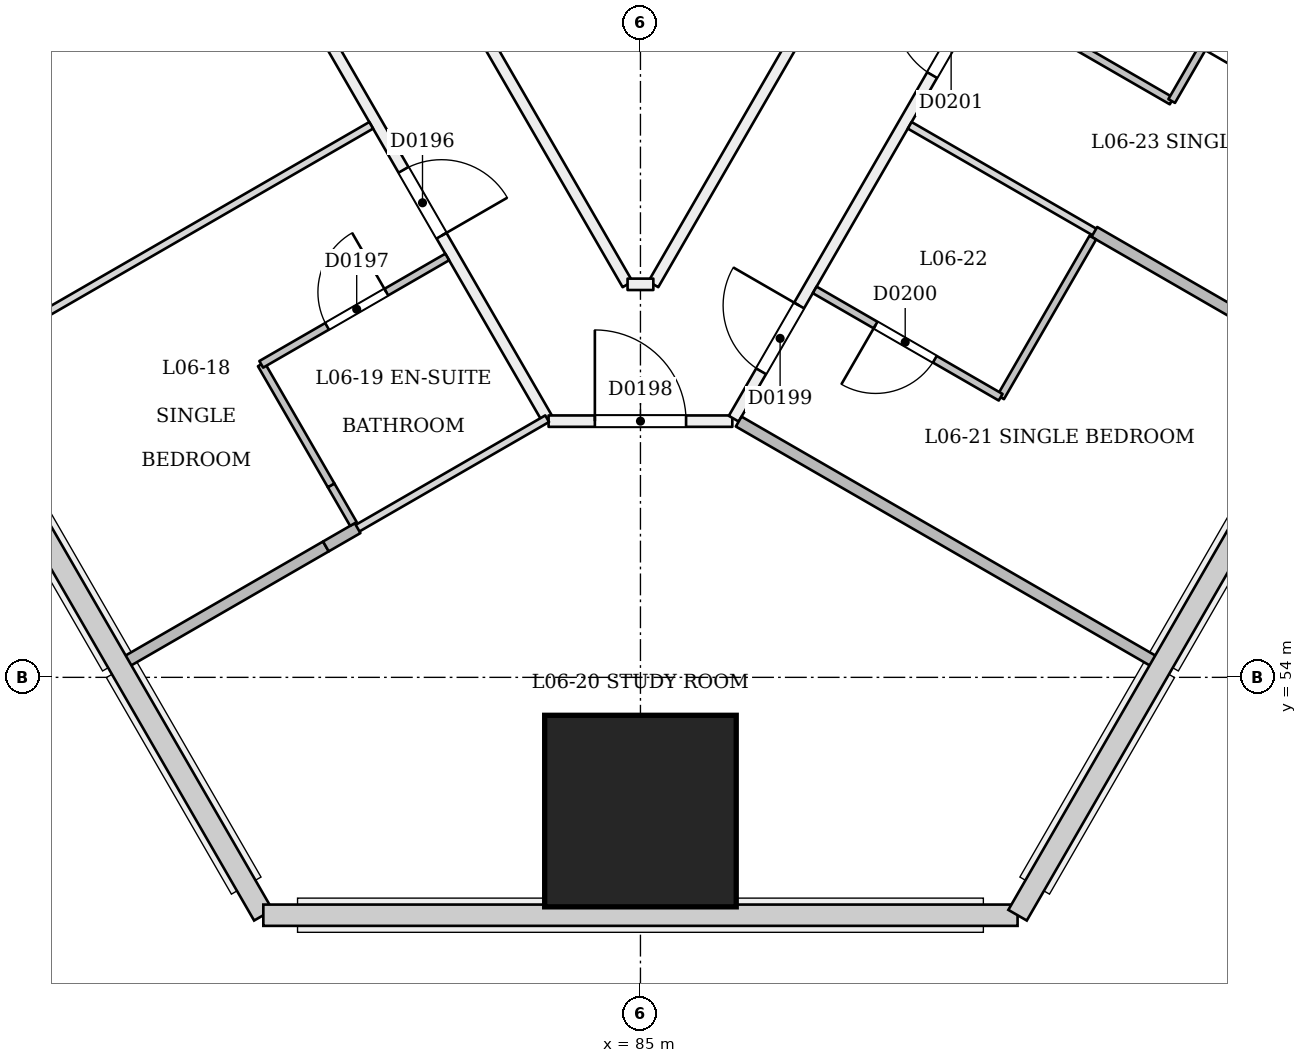
"""IFC4 building model, lengths in metres.
Left out: names, types, materials, properties, quantities, classifications, styles, units other than length and angle.
Written with IfcOpenShell. Run it as: python <this file> out.ifc"""

import sys

from ifc_helpers import new_model, si_unit, direction, frame, frame_2d, origin, origin_2d, place, context, subcontext, project, spatial, rectangle, extrude, element, fill, save


model = new_model("IFC4")
c1 = context("Model", 3, precision=1e-05, world=origin(), true_north=direction((0.0, 1.0)))
c2 = subcontext(c1, "Body", "Model", "MODEL_VIEW")
j1 = project(units=[si_unit("LENGTHUNIT", "METRE"), si_unit("PLANEANGLEUNIT", "RADIAN")], contexts=[c1])
p1 = place(None, origin())
s1 = spatial("IfcSite", under=j1, at=p1, CompositionType="ELEMENT")
p2 = place(p1, origin())
s2 = spatial("IfcBuilding", under=s1, at=p2, CompositionType="ELEMENT")
p3 = place(p2, frame((0.0, 0.0, 30.6)))
s3 = spatial("IfcBuildingStorey", under=s2, at=p3, CompositionType="ELEMENT", Elevation=30.6)
p4 = place(p3, frame((85.0, 52.171, 0.0), z_axis=(0.0, 0.058360852261, 0.998295552892), x_axis=(-1.0, 0.0, 0.0)))
e1 = element("IfcColumn", 1, at=p4, inside=s3, PredefinedType="COLUMN", context=c2, shape_type="SweptSolid", body=[
    extrude(rectangle(XDim=2.52, YDim=2.52, at=origin_2d()), origin(), (0.0, 0.0, 1.0), 3.606),
])
p5 = place(p3, frame((61.273, 96.374, 0.0), z_axis=(0.0, 0.0, 1.0), x_axis=(0.5000018851, -0.866024315419, 0.0)))
e2 = element("IfcWall", 2, at=p5, inside=s3, PredefinedType="PARTITIONING", context=c2, shape_type="SweptSolid", body=[
    extrude(rectangle(XDim=45.0, YDim=0.15, at=frame_2d((22.5, 0.0))), origin(), (0.0, 0.0, 1.0), 2.7),
])
p6 = place(p5, frame((2.829, 0.0, 0.0)))
e3 = element("IfcOpeningElement", 3, at=p6, cuts=e2, PredefinedType="OPENING", context=c2, shape_type="SweptSolid", body=[
    extrude(rectangle(XDim=1.1, YDim=2.1, at=frame_2d((0.55, 1.05))), frame((0.0, 0.085, 0.0), z_axis=(0.0, -1.0, 0.0), x_axis=(1.0, 0.0, 0.0)), (0.0, 0.0, 1.0), 0.171),
])
p7 = place(p5, frame((7.3, 0.0, 0.0)))
e4 = element("IfcOpeningElement", 4, at=p7, cuts=e2, PredefinedType="OPENING", context=c2, shape_type="SweptSolid", body=[
    extrude(rectangle(XDim=1.2, YDim=2.1, at=frame_2d((0.6, 1.05))), frame((0.0, 0.085, 0.0), z_axis=(0.0, -1.0, 0.0), x_axis=(1.0, 0.0, 0.0)), (0.0, 0.0, 1.0), 0.171),
])
p8 = place(p5, frame((14.22, 0.0, 0.0)))
e5 = element("IfcOpeningElement", 5, at=p8, cuts=e2, PredefinedType="OPENING", context=c2, shape_type="SweptSolid", body=[
    extrude(rectangle(XDim=1.0, YDim=2.1, at=frame_2d((0.5, 1.05))), frame((0.0, 0.085, 0.0), z_axis=(0.0, -1.0, 0.0), x_axis=(1.0, 0.0, 0.0)), (0.0, 0.0, 1.0), 0.171),
])
p9 = place(p5, frame((20.895, 0.0, 0.0)))
e6 = element("IfcOpeningElement", 6, at=p9, cuts=e2, PredefinedType="OPENING", context=c2, shape_type="SweptSolid", body=[
    extrude(rectangle(XDim=1.0, YDim=2.1, at=frame_2d((0.5, 1.05))), frame((0.0, 0.085, 0.0), z_axis=(0.0, -1.0, 0.0), x_axis=(1.0, 0.0, 0.0)), (0.0, 0.0, 1.0), 0.171),
])
p10 = place(p5, frame((24.25, 0.0, 0.0)))
e7 = element("IfcOpeningElement", 7, at=p10, cuts=e2, PredefinedType="OPENING", context=c2, shape_type="SweptSolid", body=[
    extrude(rectangle(XDim=1.0, YDim=2.1, at=frame_2d((0.5, 1.05))), frame((0.0, 0.085, 0.0), z_axis=(0.0, -1.0, 0.0), x_axis=(1.0, 0.0, 0.0)), (0.0, 0.0, 1.0), 0.171),
])
p11 = place(p5, frame((29.78, 0.0, 0.0)))
e8 = element("IfcOpeningElement", 8, at=p11, cuts=e2, PredefinedType="OPENING", context=c2, shape_type="SweptSolid", body=[
    extrude(rectangle(XDim=1.0, YDim=2.1, at=frame_2d((0.5, 1.05))), frame((0.0, 0.085, 0.0), z_axis=(0.0, -1.0, 0.0), x_axis=(1.0, 0.0, 0.0)), (0.0, 0.0, 1.0), 0.171),
])
p12 = place(p5, frame((34.3, 0.0, 0.0)))
e9 = element("IfcOpeningElement", 9, at=p12, cuts=e2, PredefinedType="OPENING", context=c2, shape_type="SweptSolid", body=[
    extrude(rectangle(XDim=1.2, YDim=2.1, at=frame_2d((0.6, 1.05))), frame((0.0, 0.085, 0.0), z_axis=(0.0, -1.0, 0.0), x_axis=(1.0, 0.0, 0.0)), (0.0, 0.0, 1.0), 0.171),
])
p13 = place(p5, frame((41.22, 0.0, 0.0)))
e10 = element("IfcOpeningElement", 10, at=p13, cuts=e2, PredefinedType="OPENING", context=c2, shape_type="SweptSolid", body=[
    extrude(rectangle(XDim=1.0, YDim=2.1, at=frame_2d((0.5, 1.05))), frame((0.0, 0.085, 0.0), z_axis=(0.0, -1.0, 0.0), x_axis=(1.0, 0.0, 0.0)), (0.0, 0.0, 1.0), 0.171),
])
p14 = place(p3, frame((83.791, 57.371, 0.0), z_axis=(0.0, 0.0, 1.0), x_axis=(1.0, 0.0, 0.0)))
e11 = element("IfcWall", 11, at=p14, inside=s3, PredefinedType="PARTITIONING", context=c2, shape_type="SweptSolid", body=[
    extrude(rectangle(XDim=2.417, YDim=0.15, at=frame_2d((1.209, 0.0))), origin(), (0.0, 0.0, 1.0), 3.1),
])
p15 = place(p14, frame((0.609, 0.0, 0.0)))
e12 = element("IfcOpeningElement", 12, at=p15, cuts=e11, PredefinedType="OPENING", context=c2, shape_type="SweptSolid", body=[
    extrude(rectangle(XDim=1.2, YDim=2.1, at=frame_2d((0.6, 1.05))), frame((0.0, 0.085, 0.0), z_axis=(0.0, -1.0, 0.0), x_axis=(1.0, 0.0, 0.0)), (0.0, 0.0, 1.0), 0.171),
])
p16 = place(p3, frame((86.227, 57.403, 0.0), z_axis=(0.0, 0.0, 1.0), x_axis=(0.5000018851, 0.866024315419, 0.0)))
e13 = element("IfcWall", 13, at=p16, inside=s3, PredefinedType="PARTITIONING", context=c2, shape_type="SweptSolid", body=[
    extrude(rectangle(XDim=45.0, YDim=0.15, at=frame_2d((22.5, 0.0))), origin(), (0.0, 0.0, 1.0), 2.7),
])
p17 = place(p16, frame((0.72, 0.0, 0.0)))
e14 = element("IfcOpeningElement", 14, at=p17, cuts=e13, PredefinedType="OPENING", context=c2, shape_type="SweptSolid", body=[
    extrude(rectangle(XDim=1.0, YDim=2.1, at=frame_2d((0.5, 1.05))), frame((0.0, 0.085, 0.0), z_axis=(0.0, -1.0, 0.0), x_axis=(1.0, 0.0, 0.0)), (0.0, 0.0, 1.0), 0.171),
])
p18 = place(p16, frame((5.22, 0.0, 0.0)))
e15 = element("IfcOpeningElement", 15, at=p18, cuts=e13, PredefinedType="OPENING", context=c2, shape_type="SweptSolid", body=[
    extrude(rectangle(XDim=1.0, YDim=2.1, at=frame_2d((0.5, 1.05))), frame((0.0, 0.085, 0.0), z_axis=(0.0, -1.0, 0.0), x_axis=(1.0, 0.0, 0.0)), (0.0, 0.0, 1.0), 0.171),
])
p19 = place(p16, frame((11.78, 0.0, 0.0)))
e16 = element("IfcOpeningElement", 16, at=p19, cuts=e13, PredefinedType="OPENING", context=c2, shape_type="SweptSolid", body=[
    extrude(rectangle(XDim=1.0, YDim=2.1, at=frame_2d((0.5, 1.05))), frame((0.0, 0.085, 0.0), z_axis=(0.0, -1.0, 0.0), x_axis=(1.0, 0.0, 0.0)), (0.0, 0.0, 1.0), 0.171),
])
p20 = place(p16, frame((14.22, 0.0, 0.0)))
e17 = element("IfcOpeningElement", 17, at=p20, cuts=e13, PredefinedType="OPENING", context=c2, shape_type="SweptSolid", body=[
    extrude(rectangle(XDim=1.0, YDim=2.1, at=frame_2d((0.5, 1.05))), frame((0.0, 0.085, 0.0), z_axis=(0.0, -1.0, 0.0), x_axis=(1.0, 0.0, 0.0)), (0.0, 0.0, 1.0), 0.171),
])
p21 = place(p16, frame((19.75, 0.0, 0.0)))
e18 = element("IfcOpeningElement", 18, at=p21, cuts=e13, PredefinedType="OPENING", context=c2, shape_type="SweptSolid", body=[
    extrude(rectangle(XDim=1.0, YDim=2.1, at=frame_2d((0.5, 1.05))), frame((0.0, 0.085, 0.0), z_axis=(0.0, -1.0, 0.0), x_axis=(1.0, 0.0, 0.0)), (0.0, 0.0, 1.0), 0.171),
])
p22 = place(p16, frame((23.105, 0.0, 0.0)))
e19 = element("IfcOpeningElement", 19, at=p22, cuts=e13, PredefinedType="OPENING", context=c2, shape_type="SweptSolid", body=[
    extrude(rectangle(XDim=1.0, YDim=2.1, at=frame_2d((0.5, 1.05))), frame((0.0, 0.085, 0.0), z_axis=(0.0, -1.0, 0.0), x_axis=(1.0, 0.0, 0.0)), (0.0, 0.0, 1.0), 0.171),
])
p23 = place(p16, frame((28.75, 0.0, 0.0)))
e20 = element("IfcOpeningElement", 20, at=p23, cuts=e13, PredefinedType="OPENING", context=c2, shape_type="SweptSolid", body=[
    extrude(rectangle(XDim=1.0, YDim=2.1, at=frame_2d((0.5, 1.05))), frame((0.0, 0.085, 0.0), z_axis=(0.0, -1.0, 0.0), x_axis=(1.0, 0.0, 0.0)), (0.0, 0.0, 1.0), 0.171),
])
p24 = place(p16, frame((32.105, 0.0, 0.0)))
e21 = element("IfcOpeningElement", 21, at=p24, cuts=e13, PredefinedType="OPENING", context=c2, shape_type="SweptSolid", body=[
    extrude(rectangle(XDim=1.0, YDim=2.1, at=frame_2d((0.5, 1.05))), frame((0.0, 0.085, 0.0), z_axis=(0.0, -1.0, 0.0), x_axis=(1.0, 0.0, 0.0)), (0.0, 0.0, 1.0), 0.171),
])
p25 = place(p16, frame((36.504, 0.0, 0.0)))
e22 = element("IfcOpeningElement", 22, at=p25, cuts=e13, PredefinedType="OPENING", context=c2, shape_type="SweptSolid", body=[
    extrude(rectangle(XDim=1.0, YDim=2.1, at=frame_2d((0.5, 1.05))), frame((0.0, 0.085, 0.0), z_axis=(0.0, -1.0, 0.0), x_axis=(1.0, 0.0, 0.0)), (0.0, 0.0, 1.0), 0.171),
])
p26 = place(p16, frame((38.654, 0.0, 0.0)))
e23 = element("IfcOpeningElement", 23, at=p26, cuts=e13, PredefinedType="OPENING", context=c2, shape_type="SweptSolid", body=[
    extrude(rectangle(XDim=1.0, YDim=2.1, at=frame_2d((0.5, 1.05))), frame((0.0, 0.085, 0.0), z_axis=(0.0, -1.0, 0.0), x_axis=(1.0, 0.0, 0.0)), (0.0, 0.0, 1.0), 0.171),
])
p27 = place(p16, frame((41.071, 0.0, 0.0)))
e24 = element("IfcOpeningElement", 24, at=p27, cuts=e13, PredefinedType="OPENING", context=c2, shape_type="SweptSolid", body=[
    extrude(rectangle(XDim=1.1, YDim=2.1, at=frame_2d((0.55, 1.05))), frame((0.0, 0.085, 0.0), z_axis=(0.0, -1.0, 0.0), x_axis=(1.0, 0.0, 0.0)), (0.0, 0.0, 1.0), 0.171),
])
p28 = place(p3, frame((103.315, 90.6, 0.0), z_axis=(0.0, 0.0, 1.0), x_axis=(-0.499999056994, -0.866025948229, 0.0)))
e25 = element("IfcWall", 25, at=p28, inside=s3, PredefinedType="PARTITIONING", context=c2, shape_type="SweptSolid", body=[
    extrude(rectangle(XDim=36.292, YDim=0.15, at=frame_2d((18.146, 0.0))), origin(), (0.0, 0.0, 1.0), 3.1),
])
p29 = place(p28, frame((10.576, 0.0, 0.0)))
e26 = element("IfcOpeningElement", 26, at=p29, cuts=e25, PredefinedType="OPENING", context=c2, shape_type="SweptSolid", body=[
    extrude(rectangle(XDim=1.2, YDim=2.1, at=frame_2d((0.6, 1.05))), frame((0.0, 0.085, 0.0), z_axis=(0.0, -1.0, 0.0), x_axis=(1.0, 0.0, 0.0)), (0.0, 0.0, 1.0), 0.171),
])
p30 = place(p28, frame((28.59, 0.0, 0.0)))
e27 = element("IfcOpeningElement", 27, at=p30, cuts=e25, PredefinedType="OPENING", context=c2, shape_type="SweptSolid", body=[
    extrude(rectangle(XDim=1.2, YDim=2.1, at=frame_2d((0.6, 1.05))), frame((0.0, 0.085, 0.0), z_axis=(0.0, -1.0, 0.0), x_axis=(1.0, 0.0, 0.0)), (0.0, 0.0, 1.0), 0.171),
])
p31 = place(p28, frame((17.248, 0.0, 0.0)))
e28 = element("IfcOpeningElement", 28, at=p31, cuts=e25, PredefinedType="OPENING", context=c2, shape_type="SweptSolid", body=[
    extrude(rectangle(XDim=1.2, YDim=2.1, at=frame_2d((0.6, 1.05))), frame((0.0, 0.085, 0.0), z_axis=(0.0, -1.0, 0.0), x_axis=(1.0, 0.0, 0.0)), (0.0, 0.0, 1.0), 0.171),
])
p32 = place(p28, frame((4.5, 0.0, 0.0)))
e29 = element("IfcOpeningElement", 29, at=p32, cuts=e25, PredefinedType="OPENING", context=c2, shape_type="SweptSolid", body=[
    extrude(rectangle(XDim=1.2, YDim=2.1, at=frame_2d((0.6, 1.05))), frame((0.0, 0.085, 0.0), z_axis=(0.0, -1.0, 0.0), x_axis=(1.0, 0.0, 0.0)), (0.0, 0.0, 1.0), 0.171),
])
p33 = place(p28, frame((21.947, 0.0, 0.0)))
e30 = element("IfcOpeningElement", 30, at=p33, cuts=e25, PredefinedType="OPENING", context=c2, shape_type="SweptSolid", body=[
    extrude(rectangle(XDim=1.2, YDim=2.1, at=frame_2d((0.6, 1.05))), frame((0.0, 0.085, 0.0), z_axis=(0.0, -1.0, 0.0), x_axis=(1.0, 0.0, 0.0)), (0.0, 0.0, 1.0), 0.171),
])
p34 = place(p3, frame((84.831, 59.171, 0.0), z_axis=(0.0, 0.0, 1.0), x_axis=(-0.499999056994, 0.866025948229, 0.0)))
e31 = element("IfcWall", 31, at=p34, inside=s3, PredefinedType="PARTITIONING", context=c2, shape_type="SweptSolid", body=[
    extrude(rectangle(XDim=36.292, YDim=0.15, at=frame_2d((18.146, 0.0))), origin(), (0.0, 0.0, 1.0), 3.1),
])
p35 = place(p34, frame((16.276, 0.0, 0.0)))
e32 = element("IfcOpeningElement", 32, at=p35, cuts=e31, PredefinedType="OPENING", context=c2, shape_type="SweptSolid", body=[
    extrude(rectangle(XDim=1.2, YDim=2.1, at=frame_2d((0.6, 1.05))), frame((0.0, 0.085, 0.0), z_axis=(0.0, -1.0, 0.0), x_axis=(1.0, 0.0, 0.0)), (0.0, 0.0, 1.0), 0.171),
])
p36 = place(p34, frame((27.931, 0.0, 0.0)))
e33 = element("IfcOpeningElement", 33, at=p36, cuts=e31, PredefinedType="OPENING", context=c2, shape_type="SweptSolid", body=[
    extrude(rectangle(XDim=1.2, YDim=2.1, at=frame_2d((0.6, 1.05))), frame((0.0, 0.085, 0.0), z_axis=(0.0, -1.0, 0.0), x_axis=(1.0, 0.0, 0.0)), (0.0, 0.0, 1.0), 0.171),
])
p37 = place(p3, frame((85.169, 59.171, 0.0), z_axis=(0.0, 0.0, 1.0), x_axis=(-1.0, 0.0, 0.0)))
e34 = element("IfcWall", 34, at=p37, inside=s3, PredefinedType="PARTITIONING", context=c2, shape_type="SweptSolid", body=[
    extrude(rectangle(XDim=0.339, YDim=0.15, at=frame_2d((0.169, 0.0))), origin(), (0.0, 0.0, 1.0), 3.1),
])
p38 = place(p3, frame((75.963, 58.09, 0.0), z_axis=(0.0, 0.0, 1.0), x_axis=(0.866025401434, 0.500000004071, 0.0)))
e35 = element("IfcWall", 35, at=p38, inside=s3, PredefinedType="PARTITIONING", context=c2, shape_type="SweptSolid", body=[
    extrude(rectangle(XDim=6.345, YDim=0.1, at=frame_2d((3.173, 0.0))), origin(), (0.0, 0.0, 1.0), 2.6),
])
p39 = place(p3, frame((81.224, 56.018, 0.0), z_axis=(0.0, 0.0, 1.0), x_axis=(-0.499986503906, 0.866033195618, 0.0)))
e36 = element("IfcWall", 36, at=p39, inside=s3, PredefinedType="PARTITIONING", context=c2, shape_type="SweptSolid", body=[
    extrude(rectangle(XDim=0.587, YDim=0.1, at=frame_2d((0.293, 0.0))), origin(), (0.0, 0.0, 1.0), 2.6),
])
p40 = place(p3, frame((80.93, 56.526, 0.0), z_axis=(0.0, 0.0, 1.0), x_axis=(-0.499967746641, 0.866044024469, 0.0)))
e37 = element("IfcWall", 37, at=p40, inside=s3, PredefinedType="PARTITIONING", context=c2, shape_type="SweptSolid", body=[
    extrude(rectangle(XDim=1.838, YDim=0.1, at=frame_2d((0.919, 0.0))), origin(), (0.0, 0.0, 1.0), 3.1),
])
p41 = place(p3, frame((80.011, 58.118, 0.0), z_axis=(0.0, 0.0, 1.0), x_axis=(0.866011447264, 0.500024172624, 0.0)))
e38 = element("IfcWall", 38, at=p41, inside=s3, PredefinedType="PARTITIONING", context=c2, shape_type="SweptSolid", body=[
    extrude(rectangle(XDim=2.825, YDim=0.1, at=frame_2d((1.413, 0.0))), origin(), (0.0, 0.0, 1.0), 3.1),
])
p42 = place(p41, frame((1.0, 0.0, 0.0)))
e39 = element("IfcOpeningElement", 39, at=p42, cuts=e38, PredefinedType="OPENING", context=c2, shape_type="SweptSolid", body=[
    extrude(rectangle(XDim=0.9, YDim=2.1, at=frame_2d((0.45, 1.05))), frame((0.0, 0.061, 0.0), z_axis=(0.0, -1.0, 0.0), x_axis=(1.0, 0.0, 0.0)), (0.0, 0.0, 1.0), 0.121),
])
p43 = place(p3, frame((78.213, 54.193, 0.0), z_axis=(0.0, 0.0, 1.0), x_axis=(0.866019451697, 0.500010309177, 0.0)))
e40 = element("IfcWall", 40, at=p43, inside=s3, PredefinedType="PARTITIONING", context=c2, shape_type="SweptSolid", body=[
    extrude(rectangle(XDim=3.059, YDim=0.15, at=frame_2d((1.53, 0.0))), origin(), (0.0, 0.0, 1.0), 3.1),
])
p44 = place(p3, frame((80.862, 55.722, 0.0), z_axis=(0.0, 0.0, 1.0), x_axis=(0.866143345988, 0.499795662447, 0.0)))
e41 = element("IfcWall", 41, at=p44, inside=s3, PredefinedType="PARTITIONING", context=c2, shape_type="SweptSolid", body=[
    extrude(rectangle(XDim=0.481, YDim=0.15, at=frame_2d((0.241, 0.0))), origin(), (0.0, 0.0, 1.0), 2.6),
])
p45 = place(p3, frame((81.244, 55.943, 0.0), z_axis=(0.0, 0.0, 1.0), x_axis=(0.865996226145, 0.500050533749, 0.0)))
e42 = element("IfcWall", 42, at=p45, inside=s3, PredefinedType="PARTITIONING", context=c2, shape_type="SweptSolid", body=[
    extrude(rectangle(XDim=2.92, YDim=0.1, at=frame_2d((1.46, 0.0))), origin(), (0.0, 0.0, 1.0), 2.6),
])
p46 = place(p3, frame((91.787, 54.193, 0.0), z_axis=(0.0, 0.0, 1.0), x_axis=(-0.866025401434, 0.500000004071, 0.0)))
e43 = element("IfcWall", 43, at=p46, inside=s3, PredefinedType="PARTITIONING", context=c2, shape_type="SweptSolid", body=[
    extrude(rectangle(XDim=6.345, YDim=0.15, at=frame_2d((3.173, 0.0))), origin(), (0.0, 0.0, 1.0), 2.6),
])
p47 = place(p3, frame((90.951, 59.785, 0.0), z_axis=(0.0, 0.0, 1.0), x_axis=(-0.500047793048, -0.865997808697, 0.0)))
e44 = element("IfcWall", 44, at=p47, inside=s3, PredefinedType="PARTITIONING", context=c2, shape_type="SweptSolid", body=[
    extrude(rectangle(XDim=2.425, YDim=0.1, at=frame_2d((1.212, 0.0))), origin(), (0.0, 0.0, 1.0), 3.1),
])
p48 = place(p3, frame((89.739, 57.685, 0.0), z_axis=(0.0, 0.0, 1.0), x_axis=(-0.866048868473, 0.499959355765, 0.0)))
e45 = element("IfcWall", 45, at=p48, inside=s3, PredefinedType="PARTITIONING", context=c2, shape_type="SweptSolid", body=[
    extrude(rectangle(XDim=2.825, YDim=0.1, at=frame_2d((1.413, 0.0))), origin(), (0.0, 0.0, 1.0), 3.1),
])
p49 = place(p48, frame((1.0, 0.0, 0.0)))
e46 = element("IfcOpeningElement", 46, at=p49, cuts=e45, PredefinedType="OPENING", context=c2, shape_type="SweptSolid", body=[
    extrude(rectangle(XDim=0.9, YDim=2.1, at=frame_2d((0.45, 1.05))), frame((0.0, 0.061, 0.0), z_axis=(0.0, -1.0, 0.0), x_axis=(1.0, 0.0, 0.0)), (0.0, 0.0, 1.0), 0.121),
])
p50 = place(p3, frame((94.037, 58.09, 0.0), z_axis=(0.0, 0.0, 1.0), x_axis=(-0.866036293601, 0.499981137809, 0.0)))
e47 = element("IfcWall", 47, at=p50, inside=s3, PredefinedType="PARTITIONING", context=c2, shape_type="SweptSolid", body=[
    extrude(rectangle(XDim=3.54, YDim=0.15, at=frame_2d((1.77, 0.0))), origin(), (0.0, 0.0, 1.0), 2.6),
])
p51 = place(p3, frame((91.006, 59.84, 0.0), z_axis=(0.0, 0.0, 1.0), x_axis=(-0.866011243319, 0.500024525844, 0.0)))
e48 = element("IfcWall", 48, at=p51, inside=s3, PredefinedType="PARTITIONING", context=c2, shape_type="SweptSolid", body=[
    extrude(rectangle(XDim=2.845, YDim=0.1, at=frame_2d((1.422, 0.0))), origin(), (0.0, 0.0, 1.0), 3.1),
])
p52 = place(p3, frame((91.989, 61.582, 0.0), z_axis=(0.0, 0.0, 1.0), x_axis=(-0.866011447264, 0.500024172624, 0.0)))
e49 = element("IfcWall", 49, at=p52, inside=s3, PredefinedType="PARTITIONING", context=c2, shape_type="SweptSolid", body=[
    extrude(rectangle(XDim=2.825, YDim=0.1, at=frame_2d((1.413, 0.0))), origin(), (0.0, 0.0, 1.0), 3.1),
])
p53 = place(p3, frame((94.489, 65.912, 0.0), z_axis=(0.0, 0.0, 1.0), x_axis=(-0.499983091616, -0.866035165624, 0.0)))
e50 = element("IfcWall", 50, at=p53, inside=s3, PredefinedType="PARTITIONING", context=c2, shape_type="SweptSolid", body=[
    extrude(rectangle(XDim=5.0, YDim=0.1, at=frame_2d((2.5, 0.0))), origin(), (0.0, 0.0, 1.0), 2.7),
])
p54 = place(p53, frame((3.3, 0.0, 0.0)))
e51 = element("IfcOpeningElement", 51, at=p54, cuts=e50, PredefinedType="OPENING", context=c2, shape_type="SweptSolid", body=[
    extrude(rectangle(XDim=0.9, YDim=2.1, at=frame_2d((0.45, 1.05))), frame((0.0, 0.061, 0.0), z_axis=(0.0, -1.0, 0.0), x_axis=(1.0, 0.0, 0.0)), (0.0, 0.0, 1.0), 0.121),
])
p55 = place(p53, frame((0.8, 0.0, 0.0)))
e52 = element("IfcOpeningElement", 52, at=p55, cuts=e50, PredefinedType="OPENING", context=c2, shape_type="SweptSolid", body=[
    extrude(rectangle(XDim=0.9, YDim=2.1, at=frame_2d((0.45, 1.05))), frame((0.0, 0.061, 0.0), z_axis=(0.0, -1.0, 0.0), x_axis=(1.0, 0.0, 0.0)), (0.0, 0.0, 1.0), 0.121),
])
p56 = place(p13, origin())
e53 = element("IfcDoor", 53, at=p56, inside=s3, OperationType="SINGLE_SWING_RIGHT", PredefinedType="NOTDEFINED", context=c2, shape_type="SweptSolid", body=[
    extrude(rectangle(XDim=1.0, YDim=2.1, at=frame_2d((0.5, 1.05))), frame((0.0, 0.025, 0.0), z_axis=(0.0, -1.0, 0.0), x_axis=(1.0, 0.0, 0.0)), (0.0, 0.0, 1.0), 0.05),
])
fill(e10, e53)
p57 = place(p42, origin())
e54 = element("IfcDoor", 54, at=p57, inside=s3, OperationType="SINGLE_SWING_RIGHT", PredefinedType="NOTDEFINED", context=c2, shape_type="SweptSolid", body=[
    extrude(rectangle(XDim=0.9, YDim=2.1, at=frame_2d((0.45, 1.05))), frame((0.0, 0.025, 0.0), z_axis=(0.0, -1.0, 0.0), x_axis=(1.0, 0.0, 0.0)), (0.0, 0.0, 1.0), 0.05),
])
fill(e39, e54)
p58 = place(p15, origin())
e55 = element("IfcDoor", 55, at=p58, inside=s3, OperationType="SINGLE_SWING_LEFT", PredefinedType="NOTDEFINED", context=c2, shape_type="SweptSolid", body=[
    extrude(rectangle(XDim=1.2, YDim=2.1, at=frame_2d((0.6, 1.05))), frame((0.0, 0.025, 0.0), z_axis=(0.0, -1.0, 0.0), x_axis=(1.0, 0.0, 0.0)), (0.0, 0.0, 1.0), 0.05),
])
fill(e12, e55)
p59 = place(p17, origin())
e56 = element("IfcDoor", 56, at=p59, inside=s3, OperationType="SINGLE_SWING_RIGHT", PredefinedType="NOTDEFINED", context=c2, shape_type="SweptSolid", body=[
    extrude(rectangle(XDim=1.0, YDim=2.1, at=frame_2d((0.5, 1.05))), frame((0.0, 0.025, 0.0), z_axis=(0.0, -1.0, 0.0), x_axis=(1.0, 0.0, 0.0)), (0.0, 0.0, 1.0), 0.05),
])
fill(e14, e56)
p60 = place(p49, origin())
e57 = element("IfcDoor", 57, at=p60, inside=s3, OperationType="SINGLE_SWING_RIGHT", PredefinedType="NOTDEFINED", context=c2, shape_type="SweptSolid", body=[
    extrude(rectangle(XDim=0.9, YDim=2.1, at=frame_2d((0.45, 1.05))), frame((0.0, 0.025, 0.0), z_axis=(0.0, -1.0, 0.0), x_axis=(1.0, 0.0, 0.0)), (0.0, 0.0, 1.0), 0.05),
])
fill(e46, e57)
p61 = place(p18, origin())
e58 = element("IfcDoor", 58, at=p61, inside=s3, OperationType="SINGLE_SWING_RIGHT", PredefinedType="NOTDEFINED", context=c2, shape_type="SweptSolid", body=[
    extrude(rectangle(XDim=1.0, YDim=2.1, at=frame_2d((0.5, 1.05))), frame((0.0, 0.025, 0.0), z_axis=(0.0, -1.0, 0.0), x_axis=(1.0, 0.0, 0.0)), (0.0, 0.0, 1.0), 0.05),
])
fill(e15, e58)
save(model, sys.argv[1])
